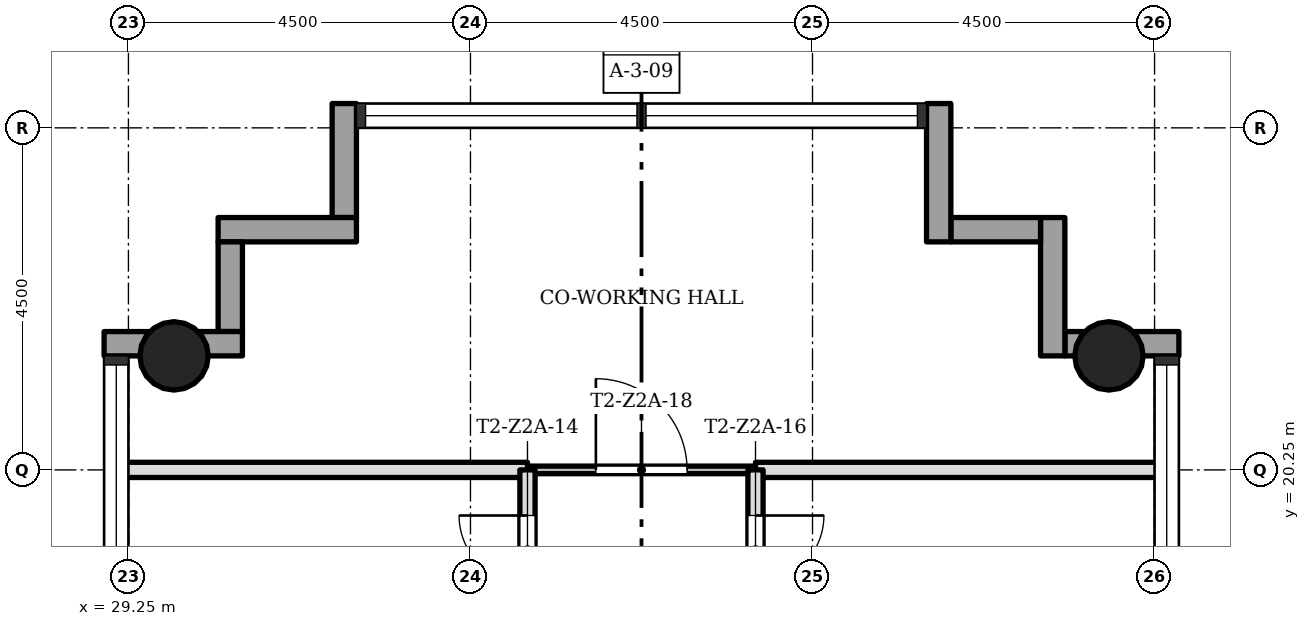
"""IFC4 building model, lengths in metres.
Left out: names, types, materials, properties, quantities, classifications, styles, units other than length and angle.
Written with IfcOpenShell. Run it as: python <this file> out.ifc"""

import sys

from ifc_helpers import new_model, si_unit, direction, frame, frame_2d, origin, origin_2d, place, context, subcontext, project, spatial, rectangle, hollow_circle, extrude, element, fill, save


model = new_model("IFC4")
c1 = context("Model", 3, precision=1e-05, world=origin(), true_north=direction((0.0, 1.0)))
c2 = subcontext(c1, "Body", "Model", "MODEL_VIEW")
j1 = project(units=[si_unit("LENGTHUNIT", "METRE"), si_unit("PLANEANGLEUNIT", "RADIAN")], contexts=[c1])
p1 = place(None, origin())
s1 = spatial("IfcSite", under=j1, at=p1, CompositionType="ELEMENT")
p2 = place(p1, origin())
s2 = spatial("IfcBuilding", under=s1, at=p2, CompositionType="ELEMENT")
p3 = place(p2, frame((0.0, 0.0, 117.4)))
s3 = spatial("IfcBuildingStorey", under=s2, at=p3, CompositionType="ELEMENT", Elevation=117.4)
for number, where, z_axis, x_axis in (
    (1, (42.15, 21.75, 0.0), (0.0, 0.0, 1.0), (1.0, 0.0, 0.0)),
    (2, (29.85, 21.75, 0.0), (0.0, 0.0, 1.0), (1.0, 0.0, 0.0)),
):
    element("IfcColumn", number, at=place(p3, frame(where, z_axis=z_axis, x_axis=x_axis)), inside=s3, PredefinedType="COLUMN", context=c2, shape_type="SweptSolid", body=[
        extrude(hollow_circle(Radius=0.45, WallThickness=0.032, at=origin_2d()), origin(), (0.0, 0.0, 1.0), 3.4),
    ])
p4 = place(p3, frame((43.07, 21.91, -0.3), z_axis=(0.0, 0.0, 1.0), x_axis=(-1.0, 0.0, 0.0)))
e3 = element("IfcWall", 3, at=p4, inside=s3, PredefinedType="STANDARD", context=c2, shape_type="SweptSolid", body=[
    extrude(rectangle(XDim=1.5, YDim=0.32, at=frame_2d((0.75, 0.0))), origin(), (0.0, 0.0, 1.0), 3.4),
])
p5 = place(p3, frame((41.41, 21.75, -0.3), z_axis=(0.0, 0.0, 1.0), x_axis=(0.0, 1.0, 0.0)))
e4 = element("IfcWall", 4, at=p5, inside=s3, PredefinedType="STANDARD", context=c2, shape_type="SweptSolid", body=[
    extrude(rectangle(XDim=1.82, YDim=0.32, at=frame_2d((0.91, 0.0))), origin(), (0.0, 0.0, 1.0), 3.4),
])
p6 = place(p3, frame((41.25, 23.41, -0.3), z_axis=(0.0, 0.0, 1.0), x_axis=(-1.0, 0.0, 0.0)))
e5 = element("IfcWall", 5, at=p6, inside=s3, PredefinedType="STANDARD", context=c2, shape_type="SweptSolid", body=[
    extrude(rectangle(XDim=1.18, YDim=0.32, at=frame_2d((0.59, 0.0))), origin(), (0.0, 0.0, 1.0), 3.4),
])
p7 = place(p3, frame((39.91, 23.25, -0.3), z_axis=(0.0, 0.0, 1.0), x_axis=(0.0, 1.0, 0.0)))
e6 = element("IfcWall", 6, at=p7, inside=s3, PredefinedType="STANDARD", context=c2, shape_type="SweptSolid", body=[
    extrude(rectangle(XDim=1.82, YDim=0.32, at=frame_2d((0.91, 0.0))), origin(), (0.0, 0.0, 1.0), 3.4),
])
p8 = place(p3, frame((32.09, 25.07, -0.3), z_axis=(0.0, 0.0, 1.0), x_axis=(0.0, -1.0, 0.0)))
e7 = element("IfcWall", 7, at=p8, inside=s3, PredefinedType="STANDARD", context=c2, shape_type="SweptSolid", body=[
    extrude(rectangle(XDim=1.5, YDim=0.32, at=frame_2d((0.75, 0.0))), origin(), (0.0, 0.0, 1.0), 3.4),
])
p9 = place(p3, frame((32.25, 23.41, -0.3), z_axis=(0.0, 0.0, 1.0), x_axis=(-1.0, 0.0, 0.0)))
e8 = element("IfcWall", 8, at=p9, inside=s3, PredefinedType="STANDARD", context=c2, shape_type="SweptSolid", body=[
    extrude(rectangle(XDim=1.82, YDim=0.32, at=frame_2d((0.91, 0.0))), origin(), (0.0, 0.0, 1.0), 3.4),
])
p10 = place(p3, frame((30.59, 23.25, -0.3), z_axis=(0.0, 0.0, 1.0), x_axis=(0.0, -1.0, 0.0)))
e9 = element("IfcWall", 9, at=p10, inside=s3, PredefinedType="STANDARD", context=c2, shape_type="SweptSolid", body=[
    extrude(rectangle(XDim=1.18, YDim=0.32, at=frame_2d((0.59, 0.0))), origin(), (0.0, 0.0, 1.0), 3.4),
])
p11 = place(p3, frame((30.75, 21.91, -0.3), z_axis=(0.0, 0.0, 1.0), x_axis=(-1.0, 0.0, 0.0)))
e10 = element("IfcWall", 10, at=p11, inside=s3, PredefinedType="STANDARD", context=c2, shape_type="SweptSolid", body=[
    extrude(rectangle(XDim=1.82, YDim=0.32, at=frame_2d((0.91, 0.0))), origin(), (0.0, 0.0, 1.0), 3.4),
])
p12 = place(p3, frame((37.5, 20.25, 0.0), z_axis=(0.0, 0.0, 1.0), x_axis=(-1.0, 0.0, 0.0)))
e11 = element("IfcWall", 11, at=p12, inside=s3, PredefinedType="PARTITIONING", context=c2, shape_type="SweptSolid", body=[
    extrude(rectangle(XDim=3.0, YDim=0.1, at=frame_2d((1.5, 0.0))), origin(), (0.0, 0.0, 1.0), 3.0),
])
p13 = place(p12, frame((0.9, 0.0, 0.0)))
e12 = element("IfcOpeningElement", 12, at=p13, cuts=e11, PredefinedType="OPENING", context=c2, shape_type="SweptSolid", body=[
    extrude(rectangle(XDim=1.2, YDim=2.1, at=frame_2d((0.6, 1.05))), frame((0.0, 0.06, 0.0), z_axis=(0.0, -1.0, 0.0), x_axis=(1.0, 0.0, 0.0)), (0.0, 0.0, 1.0), 0.12),
])
for number, where, z_axis, x_axis in (
    (13, (42.85, 20.25, 0.0), (0.0, 0.0, 1.0), (-1.0, 0.0, 0.0)),
    (14, (34.5, 20.25, 0.0), (0.0, 0.0, 1.0), (-1.0, 0.0, 0.0)),
):
    element("IfcWall", number, at=place(p3, frame(where, z_axis=z_axis, x_axis=x_axis)), inside=s3, PredefinedType="SOLIDWALL", context=c2, shape_type="SweptSolid", body=[
        extrude(rectangle(XDim=5.35, YDim=0.2, at=frame_2d((2.675, 0.0))), origin(), (0.0, 0.0, 1.0), 3.0),
    ])
p14 = place(p3, frame((37.5, 15.75, 0.0), z_axis=(0.0, 0.0, 1.0), x_axis=(0.0, 1.0, 0.0)))
e15 = element("IfcWall", 15, at=p14, inside=s3, PredefinedType="SOLIDWALL", context=c2, shape_type="SweptSolid", body=[
    extrude(rectangle(XDim=4.5, YDim=0.2, at=frame_2d((2.25, 0.0))), origin(), (0.0, 0.0, 1.0), 3.0),
])
p15 = place(p14, frame((3.0, 0.0, 0.0)))
e16 = element("IfcOpeningElement", 16, at=p15, cuts=e15, PredefinedType="OPENING", context=c2, shape_type="SweptSolid", body=[
    extrude(rectangle(XDim=0.9, YDim=2.1, at=frame_2d((0.45, 1.05))), frame((0.0, 0.11, 0.0), z_axis=(0.0, -1.0, 0.0), x_axis=(1.0, 0.0, 0.0)), (0.0, 0.0, 1.0), 0.22),
])
p16 = place(p3, frame((34.5, 15.75, 0.0), z_axis=(0.0, 0.0, 1.0), x_axis=(0.0, 1.0, 0.0)))
e17 = element("IfcWall", 17, at=p16, inside=s3, PredefinedType="SOLIDWALL", context=c2, shape_type="SweptSolid", body=[
    extrude(rectangle(XDim=4.5, YDim=0.2, at=frame_2d((2.25, 0.0))), origin(), (0.0, 0.0, 1.0), 3.0),
])
p17 = place(p16, frame((3.0, 0.0, 0.0)))
e18 = element("IfcOpeningElement", 18, at=p17, cuts=e17, PredefinedType="OPENING", context=c2, shape_type="SweptSolid", body=[
    extrude(rectangle(XDim=0.9, YDim=2.1, at=frame_2d((0.45, 1.05))), frame((0.0, 0.11, 0.0), z_axis=(0.0, -1.0, 0.0), x_axis=(1.0, 0.0, 0.0)), (0.0, 0.0, 1.0), 0.22),
])
p18 = place(p17, origin())
e19 = element("IfcDoor", 19, at=p18, inside=s3, OperationType="SINGLE_SWING_LEFT", PredefinedType="DOOR", context=c2, shape_type="SweptSolid", body=[
    extrude(rectangle(XDim=0.9, YDim=2.1, at=frame_2d((0.45, 1.05))), frame((0.0, 0.025, 0.0), z_axis=(0.0, -1.0, 0.0), x_axis=(1.0, 0.0, 0.0)), (0.0, 0.0, 1.0), 0.05),
])
fill(e18, e19)
p19 = place(p15, origin())
e20 = element("IfcDoor", 20, at=p19, inside=s3, OperationType="SINGLE_SWING_RIGHT", PredefinedType="DOOR", context=c2, shape_type="SweptSolid", body=[
    extrude(rectangle(XDim=0.9, YDim=2.1, at=frame_2d((0.45, 1.05))), frame((0.0, 0.025, 0.0), z_axis=(0.0, -1.0, 0.0), x_axis=(1.0, 0.0, 0.0)), (0.0, 0.0, 1.0), 0.05),
])
fill(e16, e20)
p20 = place(p13, origin())
e21 = element("IfcDoor", 21, at=p20, inside=s3, OperationType="SINGLE_SWING_RIGHT", PredefinedType="DOOR", context=c2, shape_type="SweptSolid", body=[
    extrude(rectangle(XDim=1.2, YDim=2.1, at=frame_2d((0.6, 1.05))), frame((0.0, 0.025, 0.0), z_axis=(0.0, -1.0, 0.0), x_axis=(1.0, 0.0, 0.0)), (0.0, 0.0, 1.0), 0.05),
])
fill(e12, e21)
save(model, sys.argv[1])
